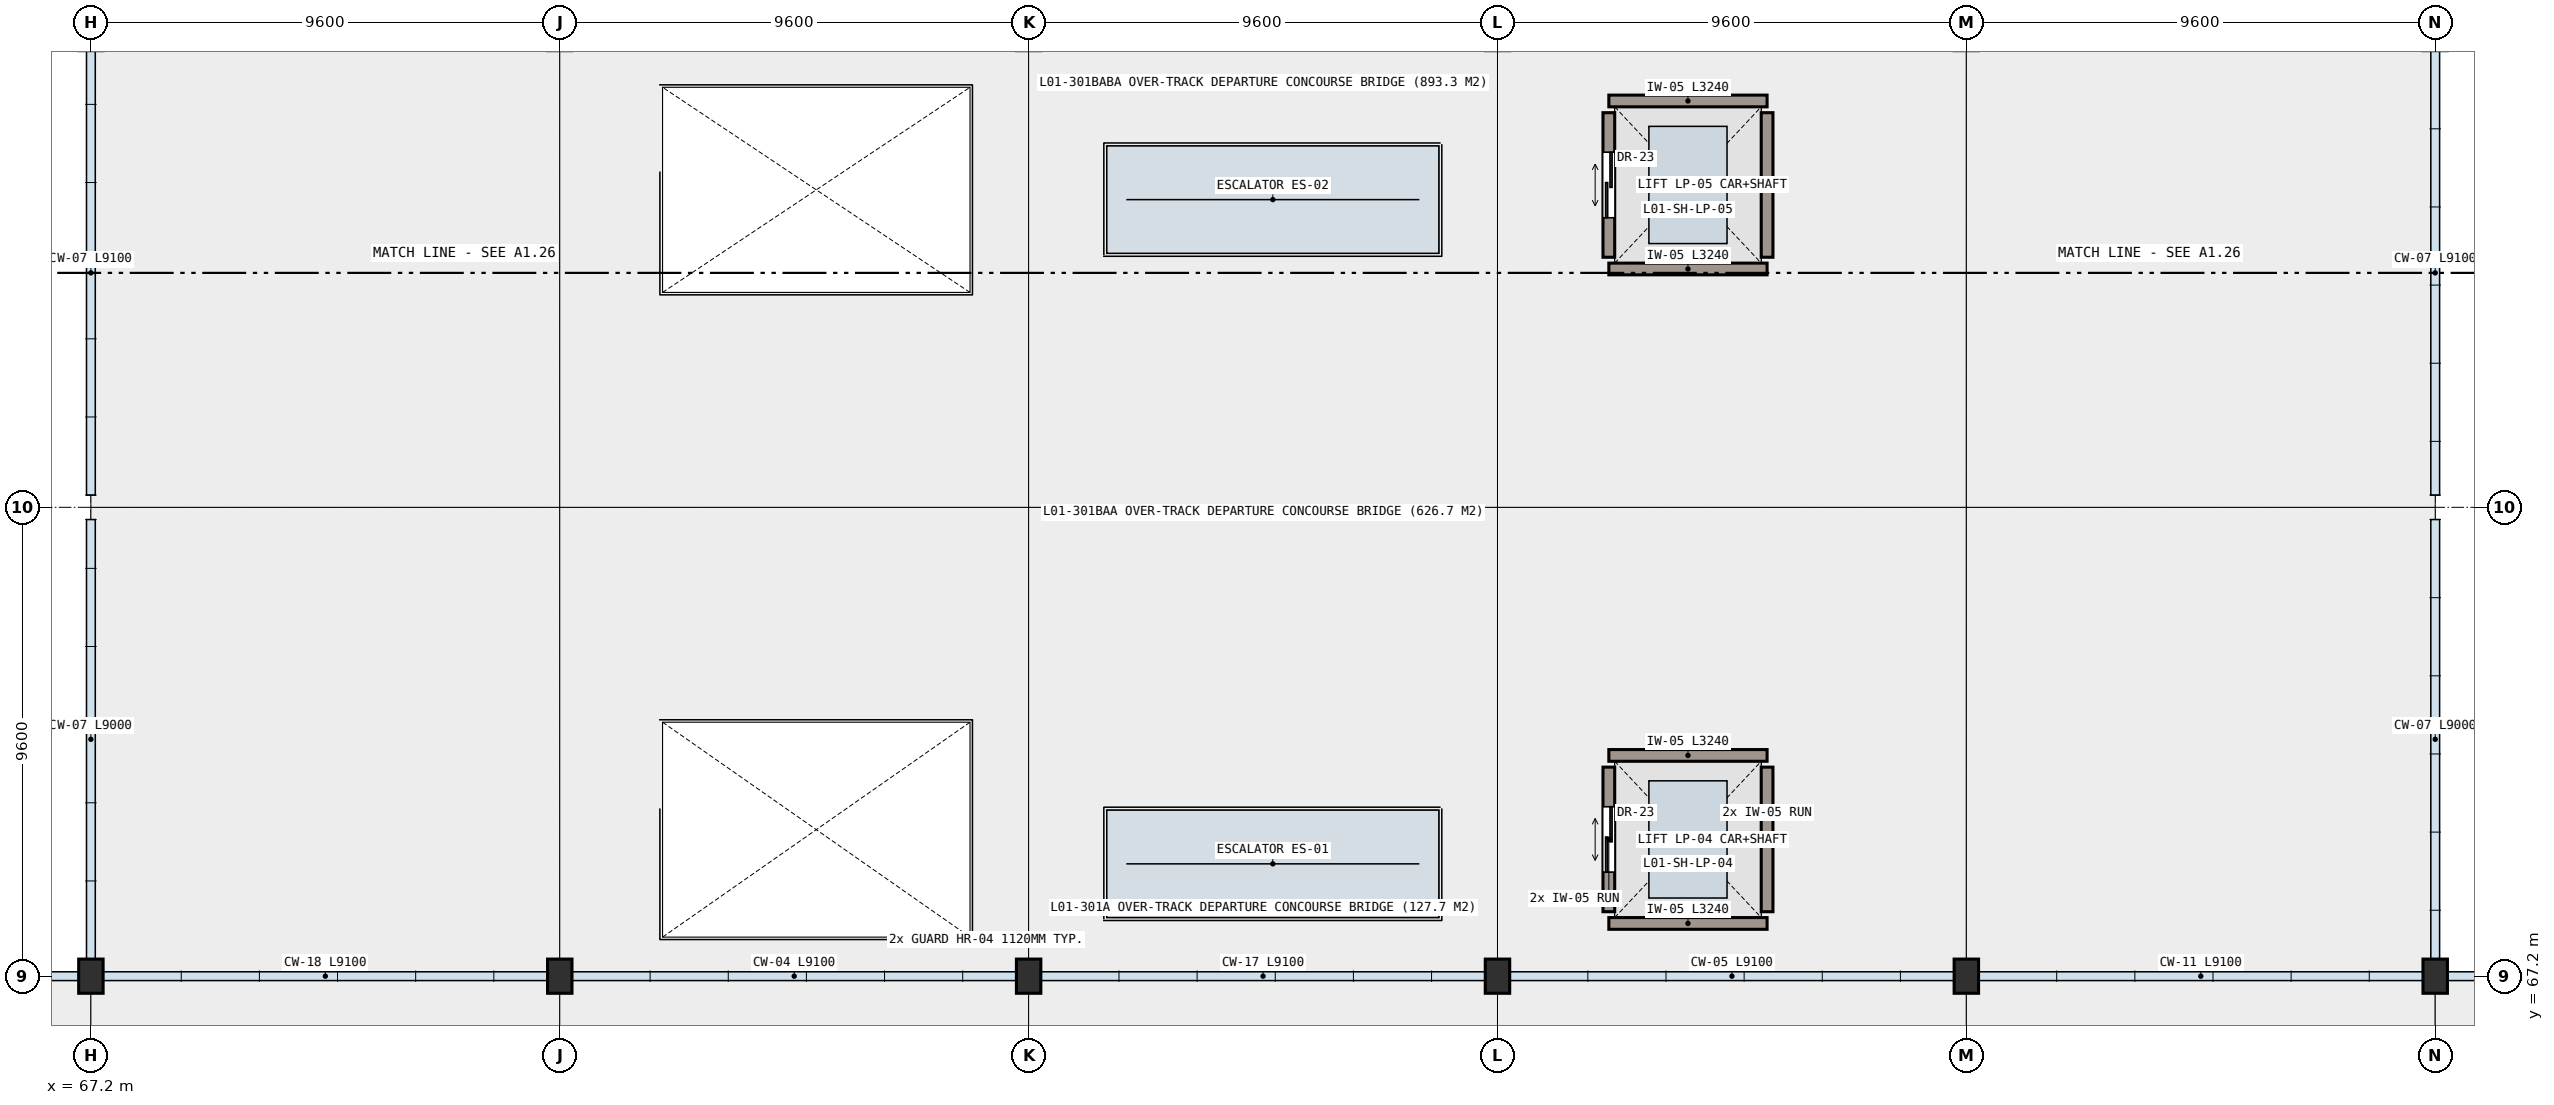
"""IFC4 building model, lengths in metres.
Left out: names, types, materials, properties, quantities, classifications, styles, units other than length and angle.
Written with IfcOpenShell. Run it as: python <this file> out.ifc"""

import sys

from ifc_helpers import new_model, si_unit, direction, frame, frame_2d, origin, origin_2d, place, context, subcontext, project, spatial, rectangle, hollow_rectangle, extrude, element, fill, save


model = new_model("IFC4")
c1 = context("Model", 3, precision=1e-05, world=origin(), true_north=direction((0.0, 1.0)))
c2 = subcontext(c1, "Body", "Model", "MODEL_VIEW")
j1 = project(units=[si_unit("LENGTHUNIT", "METRE"), si_unit("PLANEANGLEUNIT", "RADIAN")], contexts=[c1])
p1 = place(None, origin())
s1 = spatial("IfcSite", under=j1, at=p1, CompositionType="ELEMENT")
p2 = place(p1, origin())
s2 = spatial("IfcBuilding", under=s1, at=p2, CompositionType="ELEMENT")
p3 = place(p2, frame((0.0, 0.0, 5.4)))
s3 = spatial("IfcBuildingStorey", under=s2, at=p3, CompositionType="ELEMENT", Elevation=5.4)
for number, where, z_axis, x_axis in (
    (1, (67.2, 67.2, 0.0), (0.0, 0.0, 1.0), (1.0, 0.0, 0.0)),
    (2, (76.8, 67.2, 0.0), (0.0, 0.0, 1.0), (1.0, 0.0, 0.0)),
    (3, (86.4, 67.2, 0.0), (0.0, 0.0, 1.0), (1.0, 0.0, 0.0)),
    (4, (96.0, 67.2, 0.0), (0.0, 0.0, 1.0), (1.0, 0.0, 0.0)),
    (5, (105.6, 67.2, 0.0), (0.0, 0.0, 1.0), (1.0, 0.0, 0.0)),
    (6, (115.2, 67.2, 0.0), (0.0, 0.0, 1.0), (1.0, 0.0, 0.0)),
):
    element("IfcColumn", number, at=place(p3, frame(where, z_axis=z_axis, x_axis=x_axis)), inside=s3, PredefinedType="COLUMN", context=c2, shape_type="SweptSolid", body=[
        extrude(hollow_rectangle(XDim=0.5, YDim=0.7, WallThickness=0.032, at=origin_2d()), origin(), (0.0, 0.0, 1.0), 4.8),
    ])
for number, where, z_axis, x_axis in (
    (7, (101.52, 68.28, 0.0), (0.0, 0.0, 1.0), (-1.0, 0.0, 0.0)),
    (8, (98.28, 71.72, 0.0), (0.0, 0.0, 1.0), (1.0, 0.0, 0.0)),
):
    element("IfcWall", number, at=place(p3, frame(where, z_axis=z_axis, x_axis=x_axis)), inside=s3, PredefinedType="SHEAR", context=c2, shape_type="SweptSolid", body=[
        extrude(rectangle(XDim=3.24, YDim=0.24, at=frame_2d((1.62, 0.0))), origin(), (0.0, 0.0, 1.0), 4.54),
    ])
p4 = place(p3, frame((98.28, 68.52, 0.0), z_axis=(0.0, 0.0, 1.0), x_axis=(0.0, 1.0, 0.0)))
e9 = element("IfcWall", 9, at=p4, inside=s3, PredefinedType="SHEAR", context=c2, shape_type="SweptSolid", body=[
    extrude(rectangle(XDim=2.96, YDim=0.24, at=frame_2d((1.48, 0.0))), origin(), (0.0, 0.0, 1.0), 4.54),
])
p5 = place(p4, frame((0.81, 0.0, 0.0)))
e10 = element("IfcOpeningElement", 10, at=p5, cuts=e9, PredefinedType="OPENING", context=c2, shape_type="SweptSolid", body=[
    extrude(rectangle(XDim=1.34, YDim=2.18, at=frame_2d((0.67, 1.09))), frame((0.0, 0.13, 0.0), z_axis=(0.0, -1.0, 0.0), x_axis=(1.0, 0.0, 0.0)), (0.0, 0.0, 1.0), 0.26),
])
p6 = place(p3, frame((101.52, 71.48, 0.0), z_axis=(0.0, 0.0, 1.0), x_axis=(0.0, -1.0, 0.0)))
e11 = element("IfcWall", 11, at=p6, inside=s3, PredefinedType="SHEAR", context=c2, shape_type="SweptSolid", body=[
    extrude(rectangle(XDim=2.96, YDim=0.24, at=frame_2d((1.48, 0.0))), origin(), (0.0, 0.0, 1.0), 4.54),
])
for number, where, z_axis, x_axis in (
    (12, (101.52, 81.68, 0.0), (0.0, 0.0, 1.0), (-1.0, 0.0, 0.0)),
    (13, (98.28, 85.12, 0.0), (0.0, 0.0, 1.0), (1.0, 0.0, 0.0)),
):
    element("IfcWall", number, at=place(p3, frame(where, z_axis=z_axis, x_axis=x_axis)), inside=s3, PredefinedType="SHEAR", context=c2, shape_type="SweptSolid", body=[
        extrude(rectangle(XDim=3.24, YDim=0.24, at=frame_2d((1.62, 0.0))), origin(), (0.0, 0.0, 1.0), 4.54),
    ])
p7 = place(p3, frame((98.28, 81.92, 0.0), z_axis=(0.0, 0.0, 1.0), x_axis=(0.0, 1.0, 0.0)))
e14 = element("IfcWall", 14, at=p7, inside=s3, PredefinedType="SHEAR", context=c2, shape_type="SweptSolid", body=[
    extrude(rectangle(XDim=2.96, YDim=0.24, at=frame_2d((1.48, 0.0))), origin(), (0.0, 0.0, 1.0), 4.54),
])
p8 = place(p7, frame((0.81, 0.0, 0.0)))
e15 = element("IfcOpeningElement", 15, at=p8, cuts=e14, PredefinedType="OPENING", context=c2, shape_type="SweptSolid", body=[
    extrude(rectangle(XDim=1.34, YDim=2.18, at=frame_2d((0.67, 1.09))), frame((0.0, 0.13, 0.0), z_axis=(0.0, -1.0, 0.0), x_axis=(1.0, 0.0, 0.0)), (0.0, 0.0, 1.0), 0.26),
])
p9 = place(p3, frame((101.52, 84.88, 0.0), z_axis=(0.0, 0.0, 1.0), x_axis=(0.0, -1.0, 0.0)))
e16 = element("IfcWall", 16, at=p9, inside=s3, PredefinedType="SHEAR", context=c2, shape_type="SweptSolid", body=[
    extrude(rectangle(XDim=2.96, YDim=0.24, at=frame_2d((1.48, 0.0))), origin(), (0.0, 0.0, 1.0), 4.54),
])
p10 = place(p5, origin())
e17 = element("IfcDoor", 17, at=p10, inside=s3, OperationType="DOUBLE_DOOR_SLIDING", PredefinedType="DOOR", context=c2, shape_type="SweptSolid", body=[
    extrude(rectangle(XDim=1.34, YDim=2.18, at=frame_2d((0.67, 1.09))), frame((0.0, 0.025, 0.0), z_axis=(0.0, -1.0, 0.0), x_axis=(1.0, 0.0, 0.0)), (0.0, 0.0, 1.0), 0.05),
])
fill(e10, e17)
p11 = place(p8, origin())
e18 = element("IfcDoor", 18, at=p11, inside=s3, OperationType="DOUBLE_DOOR_SLIDING", PredefinedType="DOOR", context=c2, shape_type="SweptSolid", body=[
    extrude(rectangle(XDim=1.34, YDim=2.18, at=frame_2d((0.67, 1.09))), frame((0.0, 0.025, 0.0), z_axis=(0.0, -1.0, 0.0), x_axis=(1.0, 0.0, 0.0)), (0.0, 0.0, 1.0), 0.05),
])
fill(e15, e18)
save(model, sys.argv[1])
